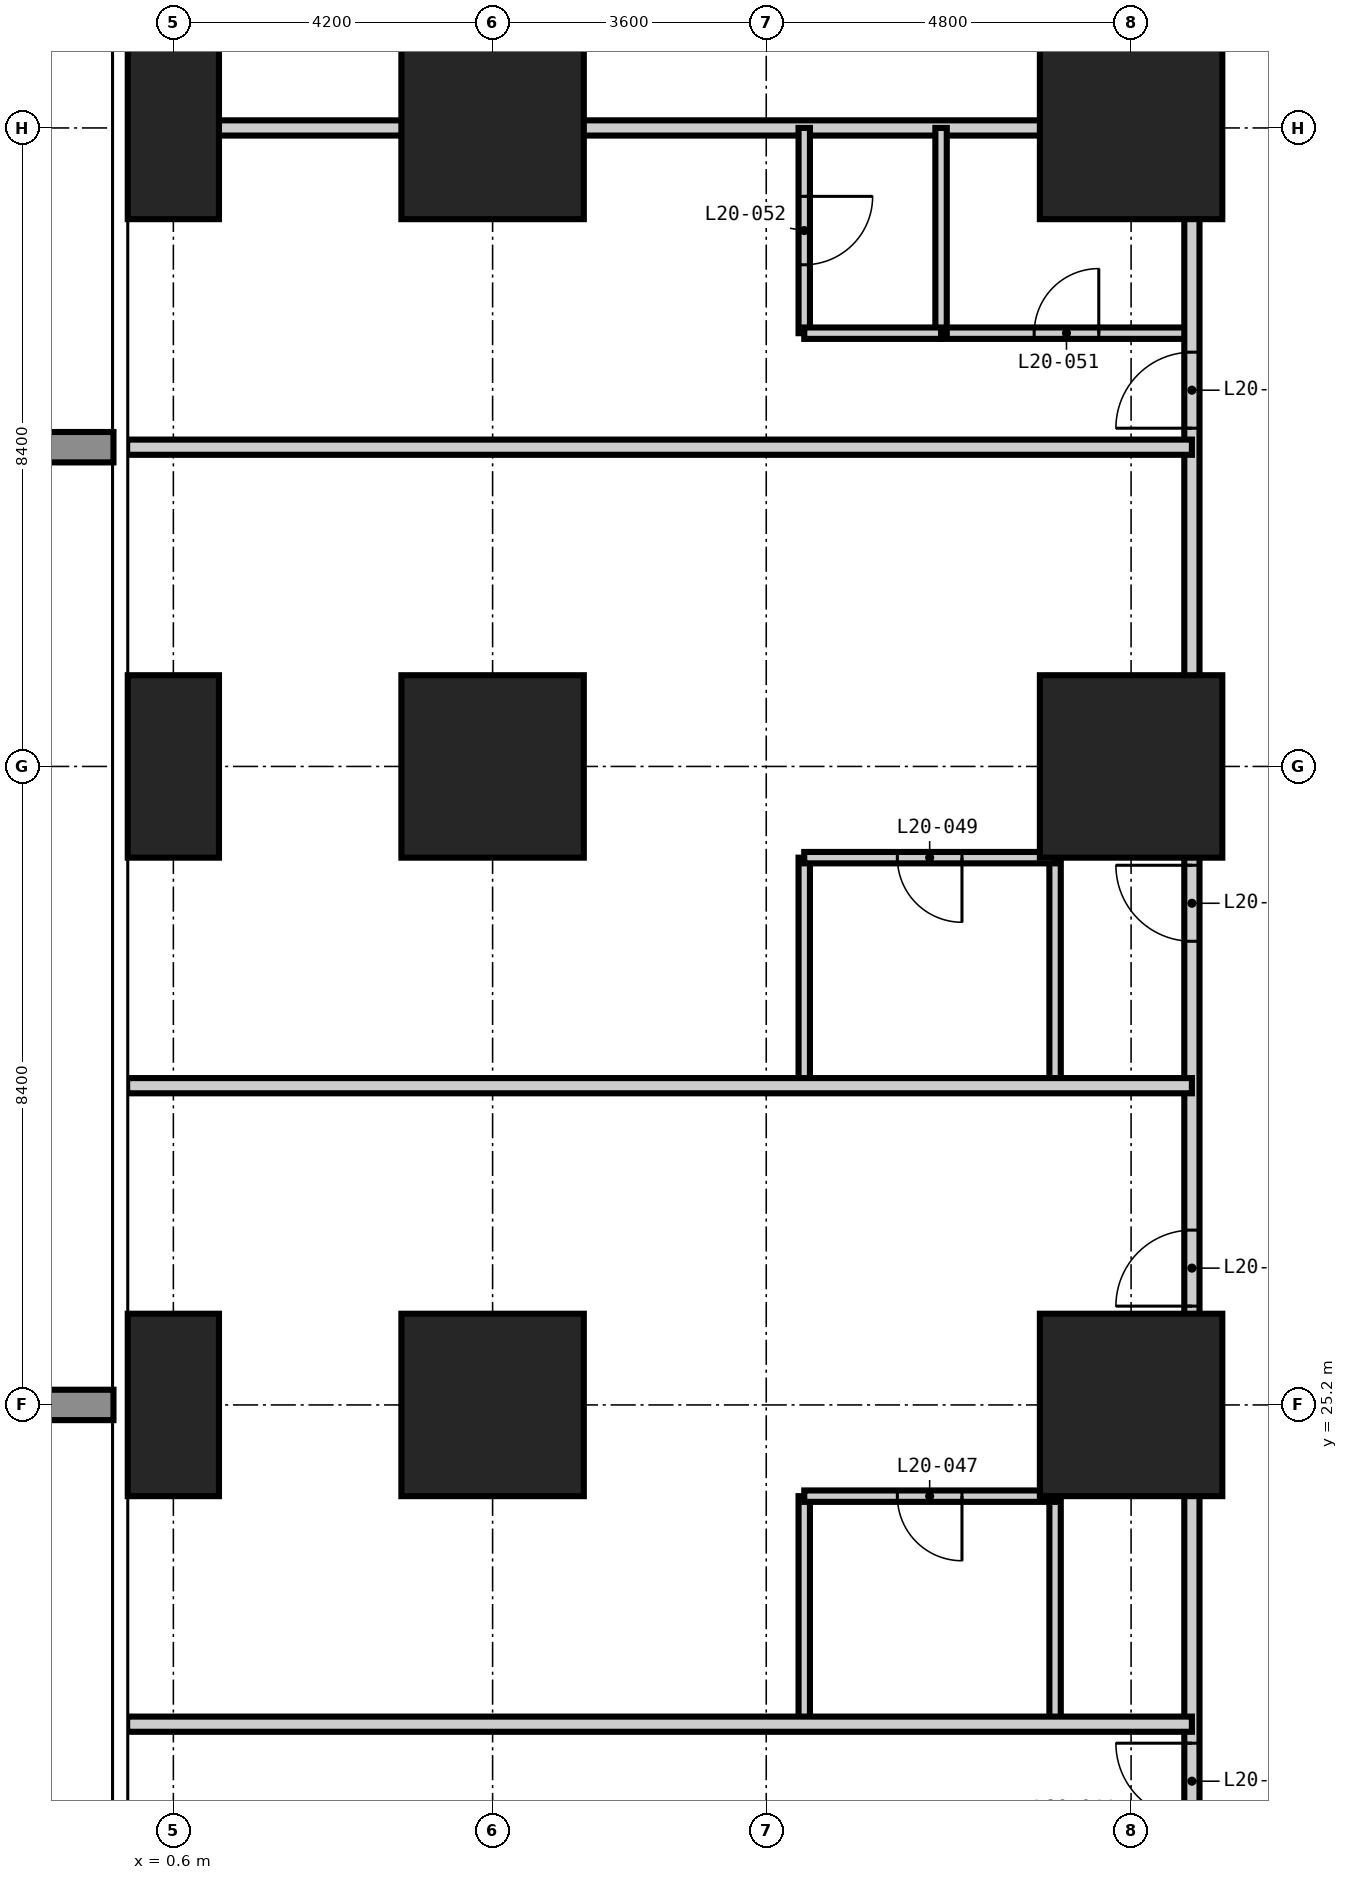
"""IFC4 building model, lengths in metres.
Left out: names, types, materials, properties, quantities, classifications, styles, units other than length and angle.
Written with IfcOpenShell. Run it as: python <this file> out.ifc"""

import sys

from ifc_helpers import new_model, si_unit, direction, frame, frame_2d, origin, origin_2d, place, context, subcontext, project, spatial, rectangle, extrude, element, fill, save


model = new_model("IFC4")
c1 = context("Model", 3, precision=1e-05, world=origin(), true_north=direction((0.0, 1.0)))
c2 = subcontext(c1, "Body", "Model", "MODEL_VIEW")
j1 = project(units=[si_unit("LENGTHUNIT", "METRE"), si_unit("PLANEANGLEUNIT", "RADIAN")], contexts=[c1])
p1 = place(None, origin())
s1 = spatial("IfcSite", under=j1, at=p1, CompositionType="ELEMENT")
p2 = place(p1, origin())
s2 = spatial("IfcBuilding", under=s1, at=p2, CompositionType="ELEMENT")
p3 = place(p2, frame((0.0, 0.0, 81.0)))
s3 = spatial("IfcBuildingStorey", under=s2, at=p3, CompositionType="ELEMENT", Elevation=81.0)
for number, where, z_axis, x_axis in (
    (1, (0.6, 25.2, -0.35), (0.0, 0.0, 1.0), (1.0, 0.0, 0.0)),
    (2, (0.6, 33.6, -0.35), (0.0, 0.0, 1.0), (1.0, 0.0, 0.0)),
    (3, (0.6, 42.0, -0.35), (0.0, 0.0, 1.0), (1.0, 0.0, 0.0)),
):
    element("IfcColumn", number, at=place(p3, frame(where, z_axis=z_axis, x_axis=x_axis)), inside=s3, PredefinedType="COLUMN", context=c2, shape_type="SweptSolid", body=[
        extrude(rectangle(XDim=1.2, YDim=2.4, at=origin_2d()), origin(), (0.0, 0.0, 1.0), 3.6),
    ])
for number, where, z_axis, x_axis in (
    (4, (4.8, 25.2, -0.35), (0.0, 0.0, 1.0), (1.0, 0.0, 0.0)),
    (5, (4.8, 33.6, -0.35), (0.0, 0.0, 1.0), (1.0, 0.0, 0.0)),
    (6, (4.8, 42.0, -0.35), (0.0, 0.0, 1.0), (1.0, 0.0, 0.0)),
    (7, (13.2, 25.2, -0.35), (0.0, 0.0, 1.0), (1.0, 0.0, 0.0)),
    (8, (13.2, 33.6, -0.35), (0.0, 0.0, 1.0), (1.0, 0.0, 0.0)),
    (9, (13.2, 42.0, -0.35), (0.0, 0.0, 1.0), (1.0, 0.0, 0.0)),
):
    element("IfcColumn", number, at=place(p3, frame(where, z_axis=z_axis, x_axis=x_axis)), inside=s3, PredefinedType="COLUMN", context=c2, shape_type="SweptSolid", body=[
        extrude(rectangle(XDim=2.4, YDim=2.4, at=origin_2d()), origin(), (0.0, 0.0, 1.0), 3.6),
    ])
for number, where, z_axis, x_axis in (
    (10, (8.9, 21.0, 0.0), (0.0, 0.0, 1.0), (0.0, 1.0, 0.0)),
    (11, (8.9, 29.4, 0.0), (0.0, 0.0, 1.0), (0.0, 1.0, 0.0)),
    (12, (12.2, 21.0, 0.0), (0.0, 0.0, 1.0), (0.0, 1.0, 0.0)),
    (13, (12.2, 29.4, 0.0), (0.0, 0.0, 1.0), (0.0, 1.0, 0.0)),
):
    element("IfcWall", number, at=place(p3, frame(where, z_axis=z_axis, x_axis=x_axis)), inside=s3, PredefinedType="PARTITIONING", context=c2, shape_type="SweptSolid", body=[
        extrude(rectangle(XDim=3.0, YDim=0.15, at=frame_2d((1.5, 0.0))), origin(), (0.0, 0.0, 1.0), 3.25),
    ])
p4 = place(p3, frame((8.9, 24.0, 0.0), z_axis=(0.0, 0.0, 1.0), x_axis=(1.0, 0.0, 0.0)))
e14 = element("IfcWall", 14, at=p4, inside=s3, PredefinedType="PARTITIONING", context=c2, shape_type="SweptSolid", body=[
    extrude(rectangle(XDim=3.3, YDim=0.15, at=frame_2d((1.65, 0.0))), origin(), (0.0, 0.0, 1.0), 3.25),
])
p5 = place(p4, frame((1.225, 0.0, 0.0)))
e15 = element("IfcOpeningElement", 15, at=p5, cuts=e14, PredefinedType="OPENING", context=c2, shape_type="SweptSolid", body=[
    extrude(rectangle(XDim=0.85, YDim=2.1, at=frame_2d((0.425, 1.05))), frame((0.0, 0.085, 0.0), z_axis=(0.0, -1.0, 0.0), x_axis=(1.0, 0.0, 0.0)), (0.0, 0.0, 1.0), 0.17),
])
p6 = place(p3, frame((8.9, 32.4, 0.0), z_axis=(0.0, 0.0, 1.0), x_axis=(1.0, 0.0, 0.0)))
e16 = element("IfcWall", 16, at=p6, inside=s3, PredefinedType="PARTITIONING", context=c2, shape_type="SweptSolid", body=[
    extrude(rectangle(XDim=3.3, YDim=0.15, at=frame_2d((1.65, 0.0))), origin(), (0.0, 0.0, 1.0), 3.25),
])
p7 = place(p6, frame((1.225, 0.0, 0.0)))
e17 = element("IfcOpeningElement", 17, at=p7, cuts=e16, PredefinedType="OPENING", context=c2, shape_type="SweptSolid", body=[
    extrude(rectangle(XDim=0.85, YDim=2.1, at=frame_2d((0.425, 1.05))), frame((0.0, 0.085, 0.0), z_axis=(0.0, -1.0, 0.0), x_axis=(1.0, 0.0, 0.0)), (0.0, 0.0, 1.0), 0.17),
])
p8 = place(p3, frame((10.7, 39.3, 0.0), z_axis=(0.0, 0.0, 1.0), x_axis=(1.0, 0.0, 0.0)))
e18 = element("IfcWall", 18, at=p8, inside=s3, PredefinedType="PARTITIONING", context=c2, shape_type="SweptSolid", body=[
    extrude(rectangle(XDim=3.3, YDim=0.15, at=frame_2d((1.65, 0.0))), origin(), (0.0, 0.0, 1.0), 3.25),
])
p9 = place(p8, frame((1.225, 0.0, 0.0)))
e19 = element("IfcOpeningElement", 19, at=p9, cuts=e18, PredefinedType="OPENING", context=c2, shape_type="SweptSolid", body=[
    extrude(rectangle(XDim=0.85, YDim=2.1, at=frame_2d((0.425, 1.05))), frame((0.0, 0.085, 0.0), z_axis=(0.0, -1.0, 0.0), x_axis=(1.0, 0.0, 0.0)), (0.0, 0.0, 1.0), 0.17),
])
p10 = place(p3, frame((14.0, 14.0, 0.0), z_axis=(0.0, 0.0, 1.0), x_axis=(0.0, 1.0, 0.0)))
e20 = element("IfcWall", 20, at=p10, inside=s3, PredefinedType="PARTITIONING", context=c2, shape_type="SweptSolid", body=[
    extrude(rectangle(XDim=32.0, YDim=0.2, at=frame_2d((16.0, 0.0))), origin(), (0.0, 0.0, 1.0), 3.25),
])
p11 = place(p10, frame((5.75, 0.0, 0.0)))
e21 = element("IfcOpeningElement", 21, at=p11, cuts=e20, PredefinedType="OPENING", context=c2, shape_type="SweptSolid", body=[
    extrude(rectangle(XDim=1.0, YDim=2.2, at=frame_2d((0.5, 1.1))), frame((0.0, 0.11, 0.0), z_axis=(0.0, -1.0, 0.0), x_axis=(1.0, 0.0, 0.0)), (0.0, 0.0, 1.0), 0.22),
])
p12 = place(p10, frame((12.5, 0.0, 0.0)))
e22 = element("IfcOpeningElement", 22, at=p12, cuts=e20, PredefinedType="OPENING", context=c2, shape_type="SweptSolid", body=[
    extrude(rectangle(XDim=1.0, YDim=2.2, at=frame_2d((0.5, 1.1))), frame((0.0, 0.11, 0.0), z_axis=(0.0, -1.0, 0.0), x_axis=(1.0, 0.0, 0.0)), (0.0, 0.0, 1.0), 0.22),
])
p13 = place(p10, frame((17.3, 0.0, 0.0)))
e23 = element("IfcOpeningElement", 23, at=p13, cuts=e20, PredefinedType="OPENING", context=c2, shape_type="SweptSolid", body=[
    extrude(rectangle(XDim=1.0, YDim=2.2, at=frame_2d((0.5, 1.1))), frame((0.0, 0.11, 0.0), z_axis=(0.0, -1.0, 0.0), x_axis=(1.0, 0.0, 0.0)), (0.0, 0.0, 1.0), 0.22),
])
p14 = place(p10, frame((24.05, 0.0, 0.0)))
e24 = element("IfcOpeningElement", 24, at=p14, cuts=e20, PredefinedType="OPENING", context=c2, shape_type="SweptSolid", body=[
    extrude(rectangle(XDim=1.0, YDim=2.2, at=frame_2d((0.5, 1.1))), frame((0.0, 0.11, 0.0), z_axis=(0.0, -1.0, 0.0), x_axis=(1.0, 0.0, 0.0)), (0.0, 0.0, 1.0), 0.22),
])
p15 = place(p10, frame((0.5, 0.0, 0.0)))
e25 = element("IfcOpeningElement", 25, at=p15, cuts=e20, PredefinedType="OPENING", context=c2, shape_type="SweptSolid", body=[
    extrude(rectangle(XDim=1.0, YDim=2.2, at=frame_2d((0.5, 1.1))), frame((0.0, 0.11, 0.0), z_axis=(0.0, -1.0, 0.0), x_axis=(1.0, 0.0, 0.0)), (0.0, 0.0, 1.0), 0.22),
])
p16 = place(p10, frame((29.5, 0.0, 0.0)))
e26 = element("IfcOpeningElement", 26, at=p16, cuts=e20, PredefinedType="OPENING", context=c2, shape_type="SweptSolid", body=[
    extrude(rectangle(XDim=1.0, YDim=2.2, at=frame_2d((0.5, 1.1))), frame((0.0, 0.11, 0.0), z_axis=(0.0, -1.0, 0.0), x_axis=(1.0, 0.0, 0.0)), (0.0, 0.0, 1.0), 0.22),
])
for number, where, z_axis, x_axis in (
    (27, (-0.008, 21.0, 0.0), (0.0, 0.0, 1.0), (1.0, 0.0, 0.0)),
    (28, (-0.008, 29.4, 0.0), (0.0, 0.0, 1.0), (1.0, 0.0, 0.0)),
    (29, (-0.008, 37.8, 0.0), (0.0, 0.0, 1.0), (1.0, 0.0, 0.0)),
    (30, (-0.008, 42.0, 0.0), (0.0, 0.0, 1.0), (1.0, 0.0, 0.0)),
):
    element("IfcWall", number, at=place(p3, frame(where, z_axis=z_axis, x_axis=x_axis)), inside=s3, PredefinedType="PARTITIONING", context=c2, shape_type="SweptSolid", body=[
        extrude(rectangle(XDim=14.008, YDim=0.2, at=frame_2d((7.004, 0.0))), origin(), (0.0, 0.0, 1.0), 3.25),
    ])
p17 = place(p3, frame((8.9, 39.3, 0.0), z_axis=(0.0, 0.0, 1.0), x_axis=(0.0, 1.0, 0.0)))
e31 = element("IfcWall", 31, at=p17, inside=s3, PredefinedType="PARTITIONING", context=c2, shape_type="SweptSolid", body=[
    extrude(rectangle(XDim=2.7, YDim=0.15, at=frame_2d((1.35, 0.0))), origin(), (0.0, 0.0, 1.0), 3.25),
])
p18 = place(p17, frame((0.9, 0.0, 0.0)))
e32 = element("IfcOpeningElement", 32, at=p18, cuts=e31, PredefinedType="OPENING", context=c2, shape_type="SweptSolid", body=[
    extrude(rectangle(XDim=0.9, YDim=2.1, at=frame_2d((0.45, 1.05))), frame((0.0, 0.085, 0.0), z_axis=(0.0, -1.0, 0.0), x_axis=(1.0, 0.0, 0.0)), (0.0, 0.0, 1.0), 0.17),
])
p19 = place(p3, frame((10.7, 39.3, 0.0), z_axis=(0.0, 0.0, 1.0), x_axis=(0.0, 1.0, 0.0)))
e33 = element("IfcWall", 33, at=p19, inside=s3, PredefinedType="PARTITIONING", context=c2, shape_type="SweptSolid", body=[
    extrude(rectangle(XDim=2.7, YDim=0.15, at=frame_2d((1.35, 0.0))), origin(), (0.0, 0.0, 1.0), 3.25),
])
p20 = place(p3, frame((8.9, 39.3, 0.0), z_axis=(0.0, 0.0, 1.0), x_axis=(1.0, 0.0, 0.0)))
e34 = element("IfcWall", 34, at=p20, inside=s3, PredefinedType="PARTITIONING", context=c2, shape_type="SweptSolid", body=[
    extrude(rectangle(XDim=1.8, YDim=0.15, at=frame_2d((0.9, 0.0))), origin(), (0.0, 0.0, 1.0), 3.25),
])
p21 = place(p11, origin())
e35 = element("IfcDoor", 35, at=p21, inside=s3, OperationType="SINGLE_SWING_RIGHT", PredefinedType="DOOR", context=c2, shape_type="SweptSolid", body=[
    extrude(rectangle(XDim=1.0, YDim=2.2, at=frame_2d((0.5, 1.1))), frame((0.0, 0.025, 0.0), z_axis=(0.0, -1.0, 0.0), x_axis=(1.0, 0.0, 0.0)), (0.0, 0.0, 1.0), 0.05),
])
fill(e21, e35)
p22 = place(p12, origin())
e36 = element("IfcDoor", 36, at=p22, inside=s3, OperationType="SINGLE_SWING_LEFT", PredefinedType="DOOR", context=c2, shape_type="SweptSolid", body=[
    extrude(rectangle(XDim=1.0, YDim=2.2, at=frame_2d((0.5, 1.1))), frame((0.0, 0.025, 0.0), z_axis=(0.0, -1.0, 0.0), x_axis=(1.0, 0.0, 0.0)), (0.0, 0.0, 1.0), 0.05),
])
fill(e22, e36)
p23 = place(p5, frame((0.85, 0.0, 0.0), z_axis=(0.0, 0.0, 1.0), x_axis=(-1.0, 0.0, 0.0)))
e37 = element("IfcDoor", 37, at=p23, inside=s3, OperationType="SINGLE_SWING_LEFT", PredefinedType="DOOR", context=c2, shape_type="SweptSolid", body=[
    extrude(rectangle(XDim=0.85, YDim=2.1, at=frame_2d((0.425, 1.05))), frame((0.0, 0.025, 0.0), z_axis=(0.0, -1.0, 0.0), x_axis=(1.0, 0.0, 0.0)), (0.0, 0.0, 1.0), 0.05),
])
fill(e15, e37)
p24 = place(p13, origin())
e38 = element("IfcDoor", 38, at=p24, inside=s3, OperationType="SINGLE_SWING_RIGHT", PredefinedType="DOOR", context=c2, shape_type="SweptSolid", body=[
    extrude(rectangle(XDim=1.0, YDim=2.2, at=frame_2d((0.5, 1.1))), frame((0.0, 0.025, 0.0), z_axis=(0.0, -1.0, 0.0), x_axis=(1.0, 0.0, 0.0)), (0.0, 0.0, 1.0), 0.05),
])
fill(e23, e38)
p25 = place(p7, frame((0.85, 0.0, 0.0), z_axis=(0.0, 0.0, 1.0), x_axis=(-1.0, 0.0, 0.0)))
e39 = element("IfcDoor", 39, at=p25, inside=s3, OperationType="SINGLE_SWING_LEFT", PredefinedType="DOOR", context=c2, shape_type="SweptSolid", body=[
    extrude(rectangle(XDim=0.85, YDim=2.1, at=frame_2d((0.425, 1.05))), frame((0.0, 0.025, 0.0), z_axis=(0.0, -1.0, 0.0), x_axis=(1.0, 0.0, 0.0)), (0.0, 0.0, 1.0), 0.05),
])
fill(e17, e39)
p26 = place(p14, origin())
e40 = element("IfcDoor", 40, at=p26, inside=s3, OperationType="SINGLE_SWING_LEFT", PredefinedType="DOOR", context=c2, shape_type="SweptSolid", body=[
    extrude(rectangle(XDim=1.0, YDim=2.2, at=frame_2d((0.5, 1.1))), frame((0.0, 0.025, 0.0), z_axis=(0.0, -1.0, 0.0), x_axis=(1.0, 0.0, 0.0)), (0.0, 0.0, 1.0), 0.05),
])
fill(e24, e40)
p27 = place(p9, origin())
e41 = element("IfcDoor", 41, at=p27, inside=s3, OperationType="SINGLE_SWING_RIGHT", PredefinedType="DOOR", context=c2, shape_type="SweptSolid", body=[
    extrude(rectangle(XDim=0.85, YDim=2.1, at=frame_2d((0.425, 1.05))), frame((0.0, 0.025, 0.0), z_axis=(0.0, -1.0, 0.0), x_axis=(1.0, 0.0, 0.0)), (0.0, 0.0, 1.0), 0.05),
])
fill(e19, e41)
p28 = place(p18, frame((0.9, 0.0, 0.0), z_axis=(0.0, 0.0, 1.0), x_axis=(-1.0, 0.0, 0.0)))
e42 = element("IfcDoor", 42, at=p28, inside=s3, OperationType="SINGLE_SWING_LEFT", PredefinedType="DOOR", context=c2, shape_type="SweptSolid", body=[
    extrude(rectangle(XDim=0.9, YDim=2.1, at=frame_2d((0.45, 1.05))), frame((0.0, 0.025, 0.0), z_axis=(0.0, -1.0, 0.0), x_axis=(1.0, 0.0, 0.0)), (0.0, 0.0, 1.0), 0.05),
])
fill(e32, e42)
save(model, sys.argv[1])
